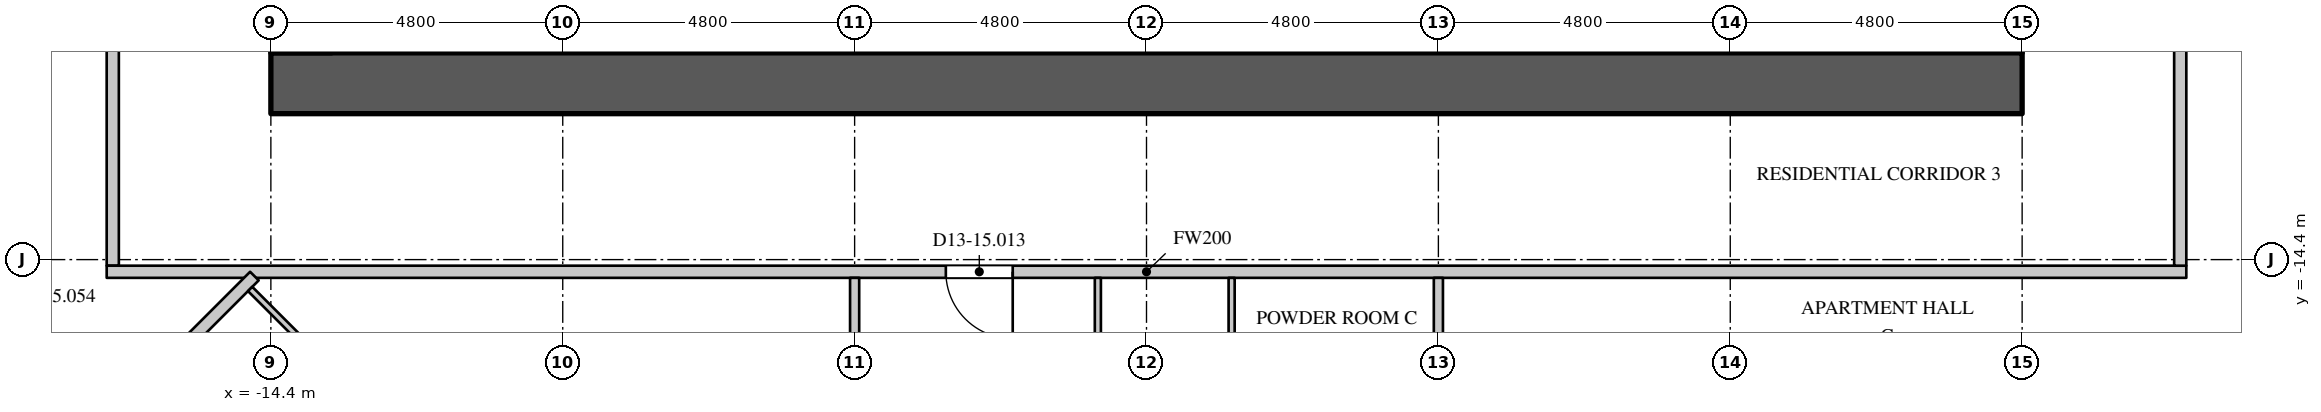
"""IFC4 building model, lengths in metres.
Left out: names, types, materials, properties, quantities, classifications, styles, units other than length and angle.
Written with IfcOpenShell. Run it as: python <this file> out.ifc"""

import sys

from ifc_helpers import new_model, si_unit, direction, frame, frame_2d, origin, place, context, subcontext, project, spatial, rectangle, extrude, element, fill, save


model = new_model("IFC4")
c1 = context("Model", 3, precision=1e-05, world=origin(), true_north=direction((0.0, 1.0)))
c2 = subcontext(c1, "Body", "Model", "MODEL_VIEW")
j1 = project(units=[si_unit("LENGTHUNIT", "METRE"), si_unit("PLANEANGLEUNIT", "RADIAN")], contexts=[c1])
p1 = place(None, origin())
s1 = spatial("IfcSite", under=j1, at=p1, CompositionType="ELEMENT")
p2 = place(p1, origin())
s2 = spatial("IfcBuilding", under=s1, at=p2, CompositionType="ELEMENT")
p3 = place(p2, frame((0.0, 0.0, 59.1)))
s3 = spatial("IfcBuildingStorey", under=s2, at=p3, CompositionType="ELEMENT", Elevation=59.1)
p4 = place(p3, frame((-14.4, -11.5, 0.0), z_axis=(0.0, 0.0, 1.0), x_axis=(1.0, 0.0, 0.0)))
e1 = element("IfcWall", 1, at=p4, inside=s3, PredefinedType="SHEAR", context=c2, shape_type="SweptSolid", body=[
    extrude(rectangle(XDim=28.8, YDim=1.0, at=frame_2d((14.4, 0.0))), origin(), (0.0, 0.0, 1.0), 4.2),
])
p5 = place(p3, frame((-17.0, -14.5, 0.0), z_axis=(0.0, 0.0, 1.0), x_axis=(0.0, 1.0, 0.0)))
e2 = element("IfcWall", 2, at=p5, inside=s3, PredefinedType="PARTITIONING", context=c2, shape_type="SweptSolid", body=[
    extrude(rectangle(XDim=29.0, YDim=0.2, at=frame_2d((14.5, 0.0))), origin(), (0.0, 0.0, 1.0), 3.95),
])
p6 = place(p5, frame((16.55, 0.0, 0.0)))
e3 = element("IfcOpeningElement", 3, at=p6, cuts=e2, PredefinedType="OPENING", context=c2, shape_type="SweptSolid", body=[
    extrude(rectangle(XDim=1.1, YDim=2.4, at=frame_2d((0.55, 1.2))), frame((0.0, 0.11, 0.0), z_axis=(0.0, -1.0, 0.0), x_axis=(1.0, 0.0, 0.0)), (0.0, 0.0, 1.0), 0.22),
])
p7 = place(p3, frame((-17.1, -14.6, 0.0), z_axis=(0.0, 0.0, 1.0), x_axis=(1.0, 0.0, 0.0)))
e4 = element("IfcWall", 4, at=p7, inside=s3, PredefinedType="PARTITIONING", context=c2, shape_type="SweptSolid", body=[
    extrude(rectangle(XDim=34.2, YDim=0.2, at=frame_2d((17.1, 0.0))), origin(), (0.0, 0.0, 1.0), 3.95),
])
p8 = place(p7, frame((13.8, 0.0, 0.0)))
e5 = element("IfcOpeningElement", 5, at=p8, cuts=e4, PredefinedType="OPENING", context=c2, shape_type="SweptSolid", body=[
    extrude(rectangle(XDim=1.1, YDim=2.4, at=frame_2d((0.55, 1.2))), frame((0.0, 0.11, 0.0), z_axis=(0.0, -1.0, 0.0), x_axis=(1.0, 0.0, 0.0)), (0.0, 0.0, 1.0), 0.22),
])
p9 = place(p3, frame((17.0, -14.5, 0.0), z_axis=(0.0, 0.0, 1.0), x_axis=(0.0, 1.0, 0.0)))
e6 = element("IfcWall", 6, at=p9, inside=s3, PredefinedType="PARTITIONING", context=c2, shape_type="SweptSolid", body=[
    extrude(rectangle(XDim=29.0, YDim=0.2, at=frame_2d((14.5, 0.0))), origin(), (0.0, 0.0, 1.0), 3.95),
])
p10 = place(p9, frame((15.9, 0.0, 0.0)))
e7 = element("IfcOpeningElement", 7, at=p10, cuts=e6, PredefinedType="OPENING", context=c2, shape_type="SweptSolid", body=[
    extrude(rectangle(XDim=1.1, YDim=2.4, at=frame_2d((0.55, 1.2))), frame((0.0, 0.11, 0.0), z_axis=(0.0, -1.0, 0.0), x_axis=(1.0, 0.0, 0.0)), (0.0, 0.0, 1.0), 0.22),
])
p11 = place(p3, frame((-22.547, -11.885, 0.0), z_axis=(0.0, 0.0, 1.0), x_axis=(0.707106781187, -0.707106781187, 0.0)))
e8 = element("IfcWall", 8, at=p11, inside=s3, PredefinedType="PARTITIONING", context=c2, shape_type="SweptSolid", body=[
    extrude(rectangle(XDim=7.439, YDim=0.15, at=frame_2d((3.72, 0.0))), origin(), (0.0, 0.0, 1.0), 3.95),
])
p12 = place(p11, frame((3.95, 0.0, 0.0)))
e9 = element("IfcOpeningElement", 9, at=p12, cuts=e8, PredefinedType="OPENING", context=c2, shape_type="SweptSolid", body=[
    extrude(rectangle(XDim=0.95, YDim=2.2, at=frame_2d((0.475, 1.1))), frame((0.0, 0.085, 0.0), z_axis=(0.0, -1.0, 0.0), x_axis=(1.0, 0.0, 0.0)), (0.0, 0.0, 1.0), 0.17),
])
p13 = place(p3, frame((-4.8, -27.9, 0.0), z_axis=(0.0, 0.0, 1.0), x_axis=(0.0, 1.0, 0.0)))
e10 = element("IfcWall", 10, at=p13, inside=s3, PredefinedType="PARTITIONING", context=c2, shape_type="SweptSolid", body=[
    extrude(rectangle(XDim=13.2, YDim=0.15, at=frame_2d((6.6, 0.0))), origin(), (0.0, 0.0, 1.0), 3.2),
])
p14 = place(p13, frame((9.2, 0.0, 0.0)))
e11 = element("IfcOpeningElement", 11, at=p14, cuts=e10, PredefinedType="OPENING", context=c2, shape_type="SweptSolid", body=[
    extrude(rectangle(XDim=0.95, YDim=2.2, at=frame_2d((0.475, 1.1))), frame((0.0, 0.085, 0.0), z_axis=(0.0, -1.0, 0.0), x_axis=(1.0, 0.0, 0.0)), (0.0, 0.0, 1.0), 0.17),
])
p15 = place(p3, frame((4.8, -18.58, 0.0), z_axis=(0.0, 0.0, 1.0), x_axis=(0.0, 1.0, 0.0)))
e12 = element("IfcWall", 12, at=p15, inside=s3, PredefinedType="PARTITIONING", context=c2, shape_type="SweptSolid", body=[
    extrude(rectangle(XDim=3.88, YDim=0.15, at=frame_2d((1.94, 0.0))), origin(), (0.0, 0.0, 1.0), 3.2),
])
p16 = place(p15, frame((1.1, 0.0, 0.0)))
e13 = element("IfcOpeningElement", 13, at=p16, cuts=e12, PredefinedType="OPENING", context=c2, shape_type="SweptSolid", body=[
    extrude(rectangle(XDim=0.95, YDim=2.2, at=frame_2d((0.475, 1.1))), frame((0.0, 0.085, 0.0), z_axis=(0.0, -1.0, 0.0), x_axis=(1.0, 0.0, 0.0)), (0.0, 0.0, 1.0), 0.17),
])
p17 = place(p3, frame((16.02, -19.26, 0.0), z_axis=(0.0, 0.0, 1.0), x_axis=(0.707106781187, 0.707106781187, 0.0)))
e14 = element("IfcWall", 14, at=p17, inside=s3, PredefinedType="PARTITIONING", context=c2, shape_type="SweptSolid", body=[
    extrude(rectangle(XDim=10.229, YDim=0.15, at=frame_2d((5.114, 0.0))), origin(), (0.0, 0.0, 1.0), 3.95),
])
p18 = place(p17, frame((4.3, 0.0, 0.0)))
e15 = element("IfcOpeningElement", 15, at=p18, cuts=e14, PredefinedType="OPENING", context=c2, shape_type="SweptSolid", body=[
    extrude(rectangle(XDim=0.95, YDim=2.2, at=frame_2d((0.475, 1.1))), frame((0.0, 0.085, 0.0), z_axis=(0.0, -1.0, 0.0), x_axis=(1.0, 0.0, 0.0)), (0.0, 0.0, 1.0), 0.17),
])
p19 = place(p17, frame((0.6, 0.0, 0.0)))
e16 = element("IfcOpeningElement", 16, at=p19, cuts=e14, PredefinedType="OPENING", context=c2, shape_type="SweptSolid", body=[
    extrude(rectangle(XDim=0.95, YDim=2.2, at=frame_2d((0.475, 1.1))), frame((0.0, 0.085, 0.0), z_axis=(0.0, -1.0, 0.0), x_axis=(1.0, 0.0, 0.0)), (0.0, 0.0, 1.0), 0.17),
])
p20 = place(p17, frame((9.1, 0.0, 0.0)))
e17 = element("IfcOpeningElement", 17, at=p20, cuts=e14, PredefinedType="OPENING", context=c2, shape_type="SweptSolid", body=[
    extrude(rectangle(XDim=0.95, YDim=2.2, at=frame_2d((0.475, 1.1))), frame((0.0, 0.085, 0.0), z_axis=(0.0, -1.0, 0.0), x_axis=(1.0, 0.0, 0.0)), (0.0, 0.0, 1.0), 0.17),
])
p21 = place(p3, frame((-19.606, -19.606, 0.0), z_axis=(0.0, 0.0, 1.0), x_axis=(0.707106781187, 0.707106781187, 0.0)))
e18 = element("IfcWall", 18, at=p21, inside=s3, PredefinedType="PARTITIONING", context=c2, shape_type="SweptSolid", body=[
    extrude(rectangle(XDim=6.979, YDim=0.2, at=frame_2d((3.49, 0.0))), origin(), (0.0, 0.0, 1.0), 3.95),
])
p22 = place(p3, frame((-14.741, -14.883, 0.0), z_axis=(0.0, 0.0, 1.0), x_axis=(0.707106781187, -0.707106781187, 0.0)))
e19 = element("IfcWall", 19, at=p22, inside=s3, PredefinedType="PARTITIONING", context=c2, shape_type="SweptSolid", body=[
    extrude(rectangle(XDim=2.65, YDim=0.1, at=frame_2d((1.325, 0.0))), origin(), (0.0, 0.0, 1.0), 3.95),
])
p23 = place(p3, frame((-0.8, -21.75, 0.0), z_axis=(0.0, 0.0, 1.0), x_axis=(0.0, 1.0, 0.0)))
e20 = element("IfcWall", 20, at=p23, inside=s3, PredefinedType="PARTITIONING", context=c2, shape_type="SweptSolid", body=[
    extrude(rectangle(XDim=7.05, YDim=0.1, at=frame_2d((3.525, 0.0))), origin(), (0.0, 0.0, 1.0), 3.95),
])
p24 = place(p23, frame((3.1, 0.0, 0.0)))
e21 = element("IfcOpeningElement", 21, at=p24, cuts=e20, PredefinedType="OPENING", context=c2, shape_type="SweptSolid", body=[
    extrude(rectangle(XDim=0.9, YDim=2.2, at=frame_2d((0.45, 1.1))), frame((0.0, 0.06, 0.0), z_axis=(0.0, -1.0, 0.0), x_axis=(1.0, 0.0, 0.0)), (0.0, 0.0, 1.0), 0.12),
])
p25 = place(p3, frame((1.4, -21.725, 0.0), z_axis=(0.0, 0.0, 1.0), x_axis=(0.0, 1.0, 0.0)))
e22 = element("IfcWall", 22, at=p25, inside=s3, PredefinedType="PARTITIONING", context=c2, shape_type="SweptSolid", body=[
    extrude(rectangle(XDim=7.025, YDim=0.1, at=frame_2d((3.513, 0.0))), origin(), (0.0, 0.0, 1.0), 3.95),
])
p26 = place(p8, origin())
e23 = element("IfcDoor", 23, at=p26, inside=s3, OperationType="SINGLE_SWING_LEFT", PredefinedType="DOOR", context=c2, shape_type="SweptSolid", body=[
    extrude(rectangle(XDim=1.1, YDim=2.4, at=frame_2d((0.55, 1.2))), frame((0.0, 0.025, 0.0), z_axis=(0.0, -1.0, 0.0), x_axis=(1.0, 0.0, 0.0)), (0.0, 0.0, 1.0), 0.05),
])
fill(e5, e23)
save(model, sys.argv[1])
